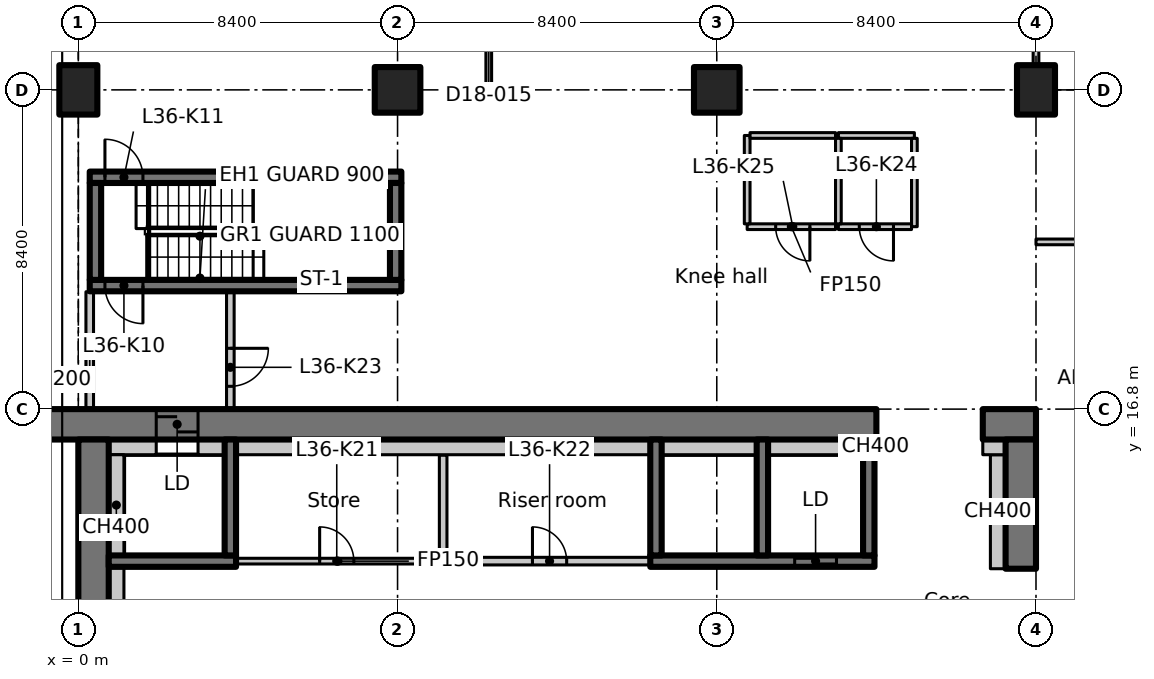
"""IFC4 building model, lengths in metres.
Left out: names, types, materials, properties, quantities, classifications, styles, units other than length and angle.
Written with IfcOpenShell. Run it as: python <this file> out.ifc"""

import sys

from ifc_helpers import new_model, si_unit, direction, frame, frame_2d, origin, origin_2d, place, context, subcontext, project, spatial, polyline, rectangle, outline, extrude, element, fill, save


model = new_model("IFC4")
c1 = context("Model", 3, precision=1e-05, world=origin(), true_north=direction((0.0, 1.0)))
c2 = subcontext(c1, "Body", "Model", "MODEL_VIEW")
j1 = project(units=[si_unit("LENGTHUNIT", "METRE"), si_unit("PLANEANGLEUNIT", "RADIAN")], contexts=[c1])
p1 = place(None, origin())
s1 = spatial("IfcSite", under=j1, at=p1, CompositionType="ELEMENT")
p2 = place(p1, origin())
s2 = spatial("IfcBuilding", under=s1, at=p2, CompositionType="ELEMENT")
p3 = place(p2, frame((0.0, 0.0, 145.7)))
s3 = spatial("IfcBuildingStorey", under=s2, at=p3, CompositionType="ELEMENT", Elevation=145.7)
p4 = place(p3, frame((0.0, 25.2, 0.0), z_axis=(0.0, 0.0, 1.0), x_axis=(1.0, 0.0, 0.0)))
e1 = element("IfcColumn", 1, at=p4, inside=s3, PredefinedType="COLUMN", context=c2, shape_type="SweptSolid", body=[
    extrude(rectangle(XDim=1.0, YDim=1.3, at=origin_2d()), origin(), (0.0, 0.0, 1.0), 3.35),
])
for number, where, z_axis, x_axis in (
    (2, (8.4, 25.2, 0.0), (0.0, 0.0, 1.0), (1.0, 0.0, 0.0)),
    (3, (16.8, 25.2, 0.0), (0.0, 0.0, 1.0), (1.0, 0.0, 0.0)),
):
    element("IfcColumn", number, at=place(p3, frame(where, z_axis=z_axis, x_axis=x_axis)), inside=s3, PredefinedType="COLUMN", context=c2, shape_type="SweptSolid", body=[
        extrude(rectangle(XDim=1.2, YDim=1.2, at=origin_2d()), origin(), (0.0, 0.0, 1.0), 3.35),
    ])
p5 = place(p3, frame((25.2, 25.2, 0.0), z_axis=(0.0, 0.0, 1.0), x_axis=(1.0, 0.0, 0.0)))
e4 = element("IfcColumn", 4, at=p5, inside=s3, PredefinedType="COLUMN", context=c2, shape_type="SweptSolid", body=[
    extrude(rectangle(XDim=1.0, YDim=1.3, at=origin_2d()), origin(), (0.0, 0.0, 1.0), 3.35),
])
p6 = place(p3, frame((-1.1, 16.4, 0.0), z_axis=(0.0, 0.0, 1.0), x_axis=(1.0, 0.0, 0.0)))
e5 = element("IfcWall", 5, at=p6, inside=s3, PredefinedType="SHEAR", context=c2, shape_type="SweptSolid", body=[
    extrude(rectangle(XDim=22.1, YDim=0.8, at=frame_2d((11.05, 0.0))), origin(), (0.0, 0.0, 1.0), 3.35),
])
p7 = place(p6, frame((3.15, 0.0, 0.0)))
e6 = element("IfcOpeningElement", 6, at=p7, cuts=e5, PredefinedType="OPENING", context=c2, shape_type="SweptSolid", body=[
    extrude(rectangle(XDim=1.1, YDim=2.3, at=frame_2d((0.55, 1.15))), frame((0.0, 0.41, 0.0), z_axis=(0.0, -1.0, 0.0), x_axis=(1.0, 0.0, 0.0)), (0.0, 0.0, 1.0), 0.82),
])
p8 = place(p3, frame((23.8, 16.4, 0.0), z_axis=(0.0, 0.0, 1.0), x_axis=(1.0, 0.0, 0.0)))
e7 = element("IfcWall", 7, at=p8, inside=s3, PredefinedType="SHEAR", context=c2, shape_type="SweptSolid", body=[
    extrude(rectangle(XDim=1.4, YDim=0.8, at=frame_2d((0.7, 0.0))), origin(), (0.0, 0.0, 1.0), 3.35),
])
p9 = place(p3, frame((0.4, 7.136, 0.0), z_axis=(0.0, 0.0, 1.0), x_axis=(0.0, 1.0, 0.0)))
e8 = element("IfcWall", 8, at=p9, inside=s3, PredefinedType="SHEAR", context=c2, shape_type="SweptSolid", body=[
    extrude(rectangle(XDim=8.864, YDim=0.8, at=frame_2d((4.432, 0.0))), origin(), (0.0, 0.0, 1.0), 3.35),
])
p10 = place(p3, frame((24.8, 12.6, 0.0), z_axis=(0.0, 0.0, 1.0), x_axis=(0.0, 1.0, 0.0)))
e9 = element("IfcWall", 9, at=p10, inside=s3, PredefinedType="SHEAR", context=c2, shape_type="SweptSolid", body=[
    extrude(rectangle(XDim=3.4, YDim=0.8, at=frame_2d((1.7, 0.0))), origin(), (0.0, 0.0, 1.0), 3.35),
])
p11 = place(p3, frame((24.2, 12.6, 0.0), z_axis=(0.0, 0.0, 1.0), x_axis=(0.0, 1.0, 0.0)))
e10 = element("IfcWall", 10, at=p11, inside=s3, PredefinedType="PARTITIONING", context=c2, shape_type="SweptSolid", body=[
    extrude(rectangle(XDim=3.0, YDim=0.4, at=frame_2d((1.5, 0.0))), origin(), (0.0, 0.0, 1.0), 3.35),
])
p12 = place(p3, frame((0.8, 15.8, 0.0), z_axis=(0.0, 0.0, 1.0), x_axis=(1.0, 0.0, 0.0)))
e11 = element("IfcWall", 11, at=p12, inside=s3, PredefinedType="PARTITIONING", context=c2, shape_type="SweptSolid", body=[
    extrude(rectangle(XDim=1.25, YDim=0.4, at=frame_2d((0.625, 0.0))), origin(), (0.0, 0.0, 1.0), 3.35),
])
p13 = place(p3, frame((23.8, 15.8, 0.0), z_axis=(0.0, 0.0, 1.0), x_axis=(1.0, 0.0, 0.0)))
e12 = element("IfcWall", 12, at=p13, inside=s3, PredefinedType="PARTITIONING", context=c2, shape_type="SweptSolid", body=[
    extrude(rectangle(XDim=0.6, YDim=0.4, at=frame_2d((0.3, 0.0))), origin(), (0.0, 0.0, 1.0), 3.35),
])
p14 = place(p3, frame((0.8, 12.8, 0.0), z_axis=(0.0, 0.0, 1.0), x_axis=(1.0, 0.0, 0.0)))
e13 = element("IfcWall", 13, at=p14, inside=s3, PredefinedType="SHEAR", context=c2, shape_type="SweptSolid", body=[
    extrude(rectangle(XDim=3.35, YDim=0.3, at=frame_2d((1.675, 0.0))), origin(), (0.0, 0.0, 1.0), 3.35),
])
p15 = place(p3, frame((4.0, 12.95, 0.0), z_axis=(0.0, 0.0, 1.0), x_axis=(0.0, 1.0, 0.0)))
e14 = element("IfcWall", 14, at=p15, inside=s3, PredefinedType="SHEAR", context=c2, shape_type="SweptSolid", body=[
    extrude(rectangle(XDim=3.05, YDim=0.3, at=frame_2d((1.525, 0.0))), origin(), (0.0, 0.0, 1.0), 3.35),
])
p16 = place(p3, frame((15.05, 12.8, 0.0), z_axis=(0.0, 0.0, 1.0), x_axis=(1.0, 0.0, 0.0)))
e15 = element("IfcWall", 15, at=p16, inside=s3, PredefinedType="SHEAR", context=c2, shape_type="SweptSolid", body=[
    extrude(rectangle(XDim=5.9, YDim=0.3, at=frame_2d((2.95, 0.0))), origin(), (0.0, 0.0, 1.0), 3.35),
])
p17 = place(p16, frame((3.8, 0.0, 0.0)))
e16 = element("IfcOpeningElement", 16, at=p17, cuts=e15, PredefinedType="OPENING", context=c2, shape_type="SweptSolid", body=[
    extrude(rectangle(XDim=1.1, YDim=2.3, at=frame_2d((0.55, 1.15))), frame((0.0, 0.16, 0.0), z_axis=(0.0, -1.0, 0.0), x_axis=(1.0, 0.0, 0.0)), (0.0, 0.0, 1.0), 0.32),
])
for number, where, z_axis, x_axis in (
    (17, (15.2, 12.95, 0.0), (0.0, 0.0, 1.0), (0.0, 1.0, 0.0)),
    (18, (18.0, 12.95, 0.0), (0.0, 0.0, 1.0), (0.0, 1.0, 0.0)),
    (19, (20.8, 12.95, 0.0), (0.0, 0.0, 1.0), (0.0, 1.0, 0.0)),
):
    element("IfcWall", number, at=place(p3, frame(where, z_axis=z_axis, x_axis=x_axis)), inside=s3, PredefinedType="SHEAR", context=c2, shape_type="SweptSolid", body=[
        extrude(rectangle(XDim=3.05, YDim=0.3, at=frame_2d((1.525, 0.0))), origin(), (0.0, 0.0, 1.0), 3.35),
    ])
p18 = place(p3, frame((8.5, 20.05, 0.0), z_axis=(0.0, 0.0, 1.0), x_axis=(-1.0, 0.0, 0.0)))
e20 = element("IfcWall", 20, at=p18, inside=s3, PredefinedType="SHEAR", context=c2, shape_type="SweptSolid", body=[
    extrude(rectangle(XDim=8.2, YDim=0.3, at=frame_2d((4.1, 0.0))), origin(), (0.0, 0.0, 1.0), 3.35),
])
p19 = place(p18, frame((6.8, 0.0, 0.0)))
e21 = element("IfcOpeningElement", 21, at=p19, cuts=e20, PredefinedType="OPENING", context=c2, shape_type="SweptSolid", body=[
    extrude(rectangle(XDim=1.0, YDim=2.1, at=frame_2d((0.5, 1.05))), frame((0.0, 0.16, 0.0), z_axis=(0.0, -1.0, 0.0), x_axis=(1.0, 0.0, 0.0)), (0.0, 0.0, 1.0), 0.32),
])
p20 = place(p3, frame((0.3, 22.9, 0.0), z_axis=(0.0, 0.0, 1.0), x_axis=(1.0, 0.0, 0.0)))
e22 = element("IfcWall", 22, at=p20, inside=s3, PredefinedType="SHEAR", context=c2, shape_type="SweptSolid", body=[
    extrude(rectangle(XDim=8.2, YDim=0.3, at=frame_2d((4.1, 0.0))), origin(), (0.0, 0.0, 1.0), 3.35),
])
p21 = place(p20, frame((0.4, 0.0, 0.0)))
e23 = element("IfcOpeningElement", 23, at=p21, cuts=e22, PredefinedType="OPENING", context=c2, shape_type="SweptSolid", body=[
    extrude(rectangle(XDim=1.0, YDim=2.1, at=frame_2d((0.5, 1.05))), frame((0.0, 0.16, 0.0), z_axis=(0.0, -1.0, 0.0), x_axis=(1.0, 0.0, 0.0)), (0.0, 0.0, 1.0), 0.32),
])
for number, where, z_axis, x_axis in (
    (24, (0.45, 20.2, 0.0), (0.0, 0.0, 1.0), (0.0, 1.0, 0.0)),
    (25, (8.35, 20.2, 0.0), (0.0, 0.0, 1.0), (0.0, 1.0, 0.0)),
):
    element("IfcWall", number, at=place(p3, frame(where, z_axis=z_axis, x_axis=x_axis)), inside=s3, PredefinedType="SHEAR", context=c2, shape_type="SweptSolid", body=[
        extrude(rectangle(XDim=2.55, YDim=0.3, at=frame_2d((1.275, 0.0))), origin(), (0.0, 0.0, 1.0), 3.35),
    ])
p22 = place(p3, frame((0.3, 16.812, 0.0), z_axis=(0.0, 0.0, 1.0), x_axis=(0.0, 1.0, 0.0)))
e26 = element("IfcWall", 26, at=p22, inside=s3, PredefinedType="PARTITIONING", context=c2, shape_type="SweptSolid", body=[
    extrude(rectangle(XDim=3.076, YDim=0.2, at=frame_2d((1.538, 0.0))), origin(), (0.0, 0.0, 1.0), 2.98),
])
p23 = place(p3, frame((4.0, 19.888, 0.0), z_axis=(0.0, 0.0, 1.0), x_axis=(0.0, -1.0, 0.0)))
e27 = element("IfcWall", 27, at=p23, inside=s3, PredefinedType="PARTITIONING", context=c2, shape_type="SweptSolid", body=[
    extrude(rectangle(XDim=3.076, YDim=0.2, at=frame_2d((1.538, 0.0))), origin(), (0.0, 0.0, 1.0), 3.35),
])
p24 = place(p23, frame((1.488, 0.0, 0.0)))
e28 = element("IfcOpeningElement", 28, at=p24, cuts=e27, PredefinedType="OPENING", context=c2, shape_type="SweptSolid", body=[
    extrude(rectangle(XDim=1.0, YDim=2.1, at=frame_2d((0.5, 1.05))), frame((0.0, 0.11, 0.0), z_axis=(0.0, -1.0, 0.0), x_axis=(1.0, 0.0, 0.0)), (0.0, 0.0, 1.0), 0.22),
])
p25 = place(p3, frame((9.6, 15.588, 0.0), z_axis=(0.0, 0.0, 1.0), x_axis=(0.0, -1.0, 0.0)))
e29 = element("IfcWall", 29, at=p25, inside=s3, PredefinedType="PARTITIONING", context=c2, shape_type="SweptSolid", body=[
    extrude(rectangle(XDim=2.788, YDim=0.2, at=frame_2d((1.394, 0.0))), origin(), (0.0, 0.0, 1.0), 3.35),
])
p26 = place(p3, frame((9.7, 12.8, 0.0), z_axis=(0.0, 0.0, 1.0), x_axis=(1.0, 0.0, 0.0)))
e30 = element("IfcWall", 30, at=p26, inside=s3, PredefinedType="PARTITIONING", context=c2, shape_type="SweptSolid", body=[
    extrude(rectangle(XDim=5.338, YDim=0.2, at=frame_2d((2.669, 0.0))), origin(), (0.0, 0.0, 1.0), 3.35),
])
p27 = place(p26, frame((2.25, 0.0, 0.0)))
e31 = element("IfcOpeningElement", 31, at=p27, cuts=e30, PredefinedType="OPENING", context=c2, shape_type="SweptSolid", body=[
    extrude(rectangle(XDim=0.9, YDim=2.1, at=frame_2d((0.45, 1.05))), frame((0.0, 0.11, 0.0), z_axis=(0.0, -1.0, 0.0), x_axis=(1.0, 0.0, 0.0)), (0.0, 0.0, 1.0), 0.22),
])
p28 = place(p3, frame((4.162, 12.8, 0.0), z_axis=(0.0, 0.0, 1.0), x_axis=(1.0, 0.0, 0.0)))
e32 = element("IfcWall", 32, at=p28, inside=s3, PredefinedType="PARTITIONING", context=c2, shape_type="SweptSolid", body=[
    extrude(rectangle(XDim=5.338, YDim=0.15, at=frame_2d((2.669, 0.0))), origin(), (0.0, 0.0, 1.0), 3.35),
])
p29 = place(p28, frame((2.188, 0.0, 0.0)))
e33 = element("IfcOpeningElement", 33, at=p29, cuts=e32, PredefinedType="OPENING", context=c2, shape_type="SweptSolid", body=[
    extrude(rectangle(XDim=0.9, YDim=2.1, at=frame_2d((0.45, 1.05))), frame((0.0, 0.085, 0.0), z_axis=(0.0, -1.0, 0.0), x_axis=(1.0, 0.0, 0.0)), (0.0, 0.0, 1.0), 0.17),
])
p30 = place(p3, frame((20.0, 24.0, 0.0), z_axis=(0.0, 0.0, 1.0), x_axis=(1.0, 0.0, 0.0)))
e34 = element("IfcWall", 34, at=p30, inside=s3, PredefinedType="PARTITIONING", context=c2, shape_type="SweptSolid", body=[
    extrude(rectangle(XDim=2.0, YDim=0.15, at=frame_2d((1.0, 0.0))), origin(), (0.0, 0.0, 1.0), 3.35),
])
p31 = place(p3, frame((22.0, 23.925, 0.0), z_axis=(0.0, 0.0, 1.0), x_axis=(0.0, -1.0, 0.0)))
e35 = element("IfcWall", 35, at=p31, inside=s3, PredefinedType="PARTITIONING", context=c2, shape_type="SweptSolid", body=[
    extrude(rectangle(XDim=2.325, YDim=0.15, at=frame_2d((1.163, 0.0))), origin(), (0.0, 0.0, 1.0), 3.35),
])
p32 = place(p3, frame((21.925, 21.6, 0.0), z_axis=(0.0, 0.0, 1.0), x_axis=(-1.0, 0.0, 0.0)))
e36 = element("IfcWall", 36, at=p32, inside=s3, PredefinedType="PARTITIONING", context=c2, shape_type="SweptSolid", body=[
    extrude(rectangle(XDim=1.925, YDim=0.15, at=frame_2d((0.962, 0.0))), origin(), (0.0, 0.0, 1.0), 3.35),
])
p33 = place(p32, frame((0.475, 0.0, 0.0)))
e37 = element("IfcOpeningElement", 37, at=p33, cuts=e36, PredefinedType="OPENING", context=c2, shape_type="SweptSolid", body=[
    extrude(rectangle(XDim=0.9, YDim=2.1, at=frame_2d((0.45, 1.05))), frame((0.0, 0.085, 0.0), z_axis=(0.0, -1.0, 0.0), x_axis=(1.0, 0.0, 0.0)), (0.0, 0.0, 1.0), 0.17),
])
p34 = place(p3, frame((20.0, 21.675, 0.0), z_axis=(0.0, 0.0, 1.0), x_axis=(0.0, 1.0, 0.0)))
e38 = element("IfcWall", 38, at=p34, inside=s3, PredefinedType="PARTITIONING", context=c2, shape_type="SweptSolid", body=[
    extrude(rectangle(XDim=2.25, YDim=0.15, at=frame_2d((1.125, 0.0))), origin(), (0.0, 0.0, 1.0), 3.35),
])
p35 = place(p3, frame((19.925, 21.6, 0.0), z_axis=(0.0, 0.0, 1.0), x_axis=(-1.0, 0.0, 0.0)))
e39 = element("IfcWall", 39, at=p35, inside=s3, PredefinedType="PARTITIONING", context=c2, shape_type="SweptSolid", body=[
    extrude(rectangle(XDim=2.325, YDim=0.15, at=frame_2d((1.163, 0.0))), origin(), (0.0, 0.0, 1.0), 3.35),
])
p36 = place(p35, frame((0.675, 0.0, 0.0)))
e40 = element("IfcOpeningElement", 40, at=p36, cuts=e39, PredefinedType="OPENING", context=c2, shape_type="SweptSolid", body=[
    extrude(rectangle(XDim=0.9, YDim=2.1, at=frame_2d((0.45, 1.05))), frame((0.0, 0.085, 0.0), z_axis=(0.0, -1.0, 0.0), x_axis=(1.0, 0.0, 0.0)), (0.0, 0.0, 1.0), 0.17),
])
p37 = place(p3, frame((17.6, 21.675, 0.0), z_axis=(0.0, 0.0, 1.0), x_axis=(0.0, 1.0, 0.0)))
e41 = element("IfcWall", 41, at=p37, inside=s3, PredefinedType="PARTITIONING", context=c2, shape_type="SweptSolid", body=[
    extrude(rectangle(XDim=2.325, YDim=0.15, at=frame_2d((1.163, 0.0))), origin(), (0.0, 0.0, 1.0), 3.35),
])
p38 = place(p3, frame((17.675, 24.0, 0.0), z_axis=(0.0, 0.0, 1.0), x_axis=(1.0, 0.0, 0.0)))
e42 = element("IfcWall", 42, at=p38, inside=s3, PredefinedType="PARTITIONING", context=c2, shape_type="SweptSolid", body=[
    extrude(rectangle(XDim=2.25, YDim=0.15, at=frame_2d((1.125, 0.0))), origin(), (0.0, 0.0, 1.0), 3.35),
])
p39 = place(p3, frame((1.0, 9.75, 0.0), z_axis=(0.0, 0.0, 1.0), x_axis=(0.0, 1.0, 0.0)))
e43 = element("IfcWall", 43, at=p39, inside=s3, PredefinedType="PARTITIONING", context=c2, shape_type="SweptSolid", body=[
    extrude(rectangle(XDim=2.9, YDim=0.4, at=frame_2d((1.45, 0.0))), origin(), (0.0, 0.0, 1.0), 3.35),
])
p40 = place(p3, frame((1.0, 12.95, 0.0), z_axis=(0.0, 0.0, 1.0), x_axis=(0.0, 1.0, 0.0)))
e44 = element("IfcWall", 44, at=p40, inside=s3, PredefinedType="PARTITIONING", context=c2, shape_type="SweptSolid", body=[
    extrude(rectangle(XDim=2.65, YDim=0.4, at=frame_2d((1.325, 0.0))), origin(), (0.0, 0.0, 1.0), 3.35),
])
p41 = place(p3, frame((3.15, 15.8, 0.0), z_axis=(0.0, 0.0, 1.0), x_axis=(1.0, 0.0, 0.0)))
e45 = element("IfcWall", 45, at=p41, inside=s3, PredefinedType="PARTITIONING", context=c2, shape_type="SweptSolid", body=[
    extrude(rectangle(XDim=0.7, YDim=0.4, at=frame_2d((0.35, 0.0))), origin(), (0.0, 0.0, 1.0), 3.35),
])
p42 = place(p3, frame((4.15, 15.8, 0.0), z_axis=(0.0, 0.0, 1.0), x_axis=(1.0, 0.0, 0.0)))
e46 = element("IfcWall", 46, at=p42, inside=s3, PredefinedType="PARTITIONING", context=c2, shape_type="SweptSolid", body=[
    extrude(rectangle(XDim=10.9, YDim=0.4, at=frame_2d((5.45, 0.0))), origin(), (0.0, 0.0, 1.0), 3.35),
])
for number, where, z_axis, x_axis in (
    (47, (15.35, 15.8, 0.0), (0.0, 0.0, 1.0), (1.0, 0.0, 0.0)),
    (48, (18.15, 15.8, 0.0), (0.0, 0.0, 1.0), (1.0, 0.0, 0.0)),
):
    element("IfcWall", number, at=place(p3, frame(where, z_axis=z_axis, x_axis=x_axis)), inside=s3, PredefinedType="PARTITIONING", context=c2, shape_type="SweptSolid", body=[
        extrude(rectangle(XDim=2.5, YDim=0.4, at=frame_2d((1.25, 0.0))), origin(), (0.0, 0.0, 1.0), 3.35),
    ])
p43 = place(p3, frame((20.95, 15.8, 0.0), z_axis=(0.0, 0.0, 1.0), x_axis=(1.0, 0.0, 0.0)))
e49 = element("IfcWall", 49, at=p43, inside=s3, PredefinedType="PARTITIONING", context=c2, shape_type="SweptSolid", body=[
    extrude(rectangle(XDim=0.05, YDim=0.4, at=frame_2d((0.025, 0.0))), origin(), (0.0, 0.0, 1.0), 3.35),
])
p44 = place(p3, frame((25.2, 21.2, 0.0), z_axis=(0.0, 0.0, 1.0), x_axis=(1.0, 0.0, 0.0)))
e50 = element("IfcWall", 50, at=p44, inside=s3, PredefinedType="PARTITIONING", context=c2, shape_type="SweptSolid", body=[
    extrude(rectangle(XDim=4.2, YDim=0.15, at=frame_2d((2.1, 0.0))), origin(), (0.0, 0.0, 1.0), 3.33),
])
p45 = place(p3, frame((25.2, 31.0, 0.0), z_axis=(0.0, 0.0, 1.0), x_axis=(0.0, -1.0, 0.0)))
e51 = element("IfcWall", 51, at=p45, inside=s3, PredefinedType="PARTITIONING", context=c2, shape_type="SweptSolid", body=[
    extrude(outline(polyline([(0.0, 0.0), (5.13, 0.0), (5.13, 2.98), (0.0, 2.98), (0.0, 0.0)])), frame((0.0, 0.075, 0.0), z_axis=(0.0, -1.0, 0.0), x_axis=(1.0, 0.0, 0.0)), (0.0, 0.0, 1.0), 0.15),
])
p46 = place(p45, frame((1.93, 0.0, 0.0)))
e52 = element("IfcOpeningElement", 52, at=p46, cuts=e51, PredefinedType="OPENING", context=c2, shape_type="SweptSolid", body=[
    extrude(rectangle(XDim=1.1, YDim=2.1, at=frame_2d((0.55, 1.05))), frame((0.0, 0.085, 0.0), z_axis=(0.0, -1.0, 0.0), x_axis=(1.0, 0.0, 0.0)), (0.0, 0.0, 1.0), 0.17),
])
p47 = place(p3, frame((10.8, 25.2, 0.0), z_axis=(0.0, 0.0, 1.0), x_axis=(0.0, 1.0, 0.0)))
e53 = element("IfcWall", 53, at=p47, inside=s3, PredefinedType="PARTITIONING", context=c2, shape_type="SweptSolid", body=[
    extrude(rectangle(XDim=4.2, YDim=0.15, at=frame_2d((2.1, 0.0))), origin(), (0.0, 0.0, 1.0), 3.33),
])
p48 = place(p47, frame((1.5, 0.0, 0.0)))
e54 = element("IfcOpeningElement", 54, at=p48, cuts=e53, PredefinedType="OPENING", context=c2, shape_type="SweptSolid", body=[
    extrude(rectangle(XDim=1.1, YDim=2.1, at=frame_2d((0.55, 1.05))), frame((0.0, 0.085, 0.0), z_axis=(0.0, -1.0, 0.0), x_axis=(1.0, 0.0, 0.0)), (0.0, 0.0, 1.0), 0.17),
])
p49 = place(p7, origin())
e55 = element("IfcDoor", 55, at=p49, inside=s3, OperationType="SLIDING_TO_LEFT", PredefinedType="DOOR", context=c2, shape_type="SweptSolid", body=[
    extrude(rectangle(XDim=1.1, YDim=2.3, at=frame_2d((0.55, 1.15))), frame((0.0, 0.025, 0.0), z_axis=(0.0, -1.0, 0.0), x_axis=(1.0, 0.0, 0.0)), (0.0, 0.0, 1.0), 0.05),
])
fill(e6, e55)
p50 = place(p17, origin())
e56 = element("IfcDoor", 56, at=p50, inside=s3, OperationType="SLIDING_TO_LEFT", PredefinedType="DOOR", context=c2, shape_type="SweptSolid", body=[
    extrude(rectangle(XDim=1.1, YDim=2.3, at=frame_2d((0.55, 1.15))), frame((0.0, 0.025, 0.0), z_axis=(0.0, -1.0, 0.0), x_axis=(1.0, 0.0, 0.0)), (0.0, 0.0, 1.0), 0.05),
])
fill(e16, e56)
p51 = place(p19, origin())
e57 = element("IfcDoor", 57, at=p51, inside=s3, OperationType="SINGLE_SWING_RIGHT", PredefinedType="DOOR", context=c2, shape_type="SweptSolid", body=[
    extrude(rectangle(XDim=1.0, YDim=2.1, at=frame_2d((0.5, 1.05))), frame((0.0, 0.025, 0.0), z_axis=(0.0, -1.0, 0.0), x_axis=(1.0, 0.0, 0.0)), (0.0, 0.0, 1.0), 0.05),
])
fill(e21, e57)
p52 = place(p21, origin())
e58 = element("IfcDoor", 58, at=p52, inside=s3, OperationType="SINGLE_SWING_LEFT", PredefinedType="DOOR", context=c2, shape_type="SweptSolid", body=[
    extrude(rectangle(XDim=1.0, YDim=2.1, at=frame_2d((0.5, 1.05))), frame((0.0, 0.025, 0.0), z_axis=(0.0, -1.0, 0.0), x_axis=(1.0, 0.0, 0.0)), (0.0, 0.0, 1.0), 0.05),
])
fill(e23, e58)
p53 = place(p29, origin())
e59 = element("IfcDoor", 59, at=p53, inside=s3, OperationType="SINGLE_SWING_LEFT", PredefinedType="DOOR", context=c2, shape_type="SweptSolid", body=[
    extrude(rectangle(XDim=0.9, YDim=2.1, at=frame_2d((0.45, 1.05))), frame((0.0, 0.025, 0.0), z_axis=(0.0, -1.0, 0.0), x_axis=(1.0, 0.0, 0.0)), (0.0, 0.0, 1.0), 0.05),
])
fill(e33, e59)
p54 = place(p27, origin())
e60 = element("IfcDoor", 60, at=p54, inside=s3, OperationType="SINGLE_SWING_RIGHT", PredefinedType="DOOR", context=c2, shape_type="SweptSolid", body=[
    extrude(rectangle(XDim=0.9, YDim=2.1, at=frame_2d((0.45, 1.05))), frame((0.0, 0.025, 0.0), z_axis=(0.0, -1.0, 0.0), x_axis=(1.0, 0.0, 0.0)), (0.0, 0.0, 1.0), 0.05),
])
fill(e31, e60)
p55 = place(p24, origin())
e61 = element("IfcDoor", 61, at=p55, inside=s3, OperationType="SINGLE_SWING_LEFT", PredefinedType="DOOR", context=c2, shape_type="SweptSolid", body=[
    extrude(rectangle(XDim=1.0, YDim=2.1, at=frame_2d((0.5, 1.05))), frame((0.0, 0.025, 0.0), z_axis=(0.0, -1.0, 0.0), x_axis=(1.0, 0.0, 0.0)), (0.0, 0.0, 1.0), 0.05),
])
fill(e28, e61)
p56 = place(p33, origin())
e62 = element("IfcDoor", 62, at=p56, inside=s3, OperationType="SINGLE_SWING_RIGHT", PredefinedType="DOOR", context=c2, shape_type="SweptSolid", body=[
    extrude(rectangle(XDim=0.9, YDim=2.1, at=frame_2d((0.45, 1.05))), frame((0.0, 0.025, 0.0), z_axis=(0.0, -1.0, 0.0), x_axis=(1.0, 0.0, 0.0)), (0.0, 0.0, 1.0), 0.05),
])
fill(e37, e62)
p57 = place(p36, origin())
e63 = element("IfcDoor", 63, at=p57, inside=s3, OperationType="SINGLE_SWING_LEFT", PredefinedType="DOOR", context=c2, shape_type="SweptSolid", body=[
    extrude(rectangle(XDim=0.9, YDim=2.1, at=frame_2d((0.45, 1.05))), frame((0.0, 0.025, 0.0), z_axis=(0.0, -1.0, 0.0), x_axis=(1.0, 0.0, 0.0)), (0.0, 0.0, 1.0), 0.05),
])
fill(e40, e63)
save(model, sys.argv[1])
